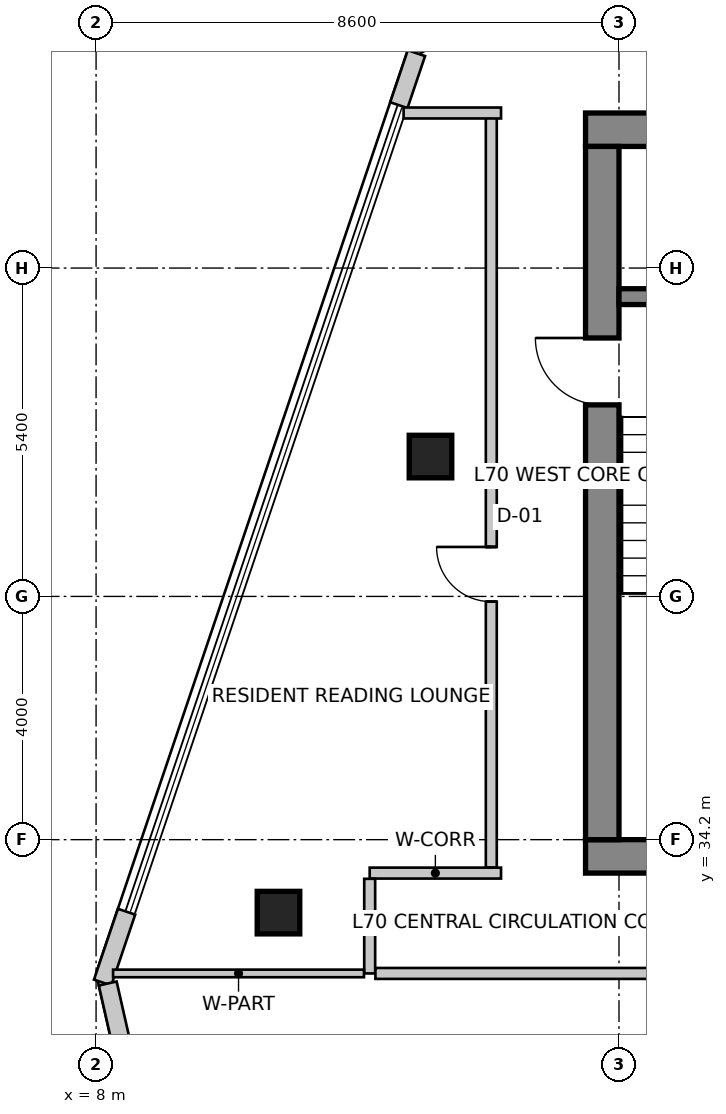
"""IFC4 building model, lengths in metres.
Left out: names, types, materials, properties, quantities, classifications, styles, units other than length and angle.
Written with IfcOpenShell. Run it as: python <this file> out.ifc"""

import sys

from ifc_helpers import new_model, si_unit, direction, frame, frame_2d, origin, origin_2d, place, context, subcontext, project, spatial, rectangle, extrude, source, transform, mapped, element, fill, save


model = new_model("IFC4")
c1 = context("Model", 3, precision=1e-05, world=origin(), true_north=direction((0.0, 1.0)))
c2 = subcontext(c1, "Body", "Model", "MODEL_VIEW")
j1 = project(units=[si_unit("LENGTHUNIT", "METRE"), si_unit("PLANEANGLEUNIT", "RADIAN")], contexts=[c1])
p1 = place(None, origin())
s1 = spatial("IfcSite", under=j1, at=p1, CompositionType="ELEMENT")
p2 = place(p1, origin())
s2 = spatial("IfcBuilding", under=s1, at=p2, CompositionType="ELEMENT")
p3 = place(p2, frame((0.0, 0.0, 274.5)))
s3 = spatial("IfcBuildingStorey", under=s2, at=p3, CompositionType="ELEMENT", Elevation=274.5)
p4 = place(p3, frame((16.05, 45.875, 0.0), z_axis=(0.0, 0.0, 1.0), x_axis=(1.0, 0.0, 0.0)))
e1 = element("IfcWall", 1, at=p4, inside=s3, PredefinedType="SHEAR", context=c2, shape_type="SweptSolid", body=[
    extrude(rectangle(XDim=15.5, YDim=0.55, at=frame_2d((7.75, 0.0))), origin(), (0.0, 0.0, 1.0), 3.6),
])
p5 = place(p3, frame((16.05, 33.925, 0.0), z_axis=(0.0, 0.0, 1.0), x_axis=(1.0, 0.0, 0.0)))
e2 = element("IfcWall", 2, at=p5, inside=s3, PredefinedType="SHEAR", context=c2, shape_type="SweptSolid", body=[
    extrude(rectangle(XDim=15.5, YDim=0.55, at=frame_2d((7.75, 0.0))), origin(), (0.0, 0.0, 1.0), 3.6),
])
m1 = source(origin(), c2, "Body", "SweptSolid", [
    extrude(rectangle(XDim=1.1, YDim=2.15, at=frame_2d((0.55, 1.075))), frame((0.0, 0.285, 0.0), z_axis=(0.0, -1.0, 0.0), x_axis=(1.0, 0.0, 0.0)), (0.0, 0.0, 1.0), 0.57),
])
p6 = place(p5, frame((9.98, 0.0, 0.0)))
e3 = element("IfcOpeningElement", 3, at=p6, cuts=e2, PredefinedType="OPENING", context=c2, shape_type="MappedRepresentation", body=[
    mapped(m1, transform((0.0, 0.0, 0.0), scale=1.0)),
])
p7 = place(p3, frame((16.325, 34.2, 0.0), z_axis=(0.0, 0.0, 1.0), x_axis=(0.0, 1.0, 0.0)))
e4 = element("IfcWall", 4, at=p7, inside=s3, PredefinedType="SHEAR", context=c2, shape_type="SweptSolid", body=[
    extrude(rectangle(XDim=11.4, YDim=0.55, at=frame_2d((5.7, 0.0))), origin(), (0.0, 0.0, 1.0), 3.6),
])
p8 = place(p7, frame((7.15, 0.0, 0.0)))
e5 = element("IfcOpeningElement", 5, at=p8, cuts=e4, PredefinedType="OPENING", context=c2, shape_type="MappedRepresentation", body=[
    mapped(m1, transform((0.0, 0.0, 0.0), scale=1.0)),
])
p9 = place(p3, frame((16.6, 43.13, 0.0), z_axis=(0.0, 0.0, 1.0), x_axis=(1.0, 0.0, 0.0)))
e6 = element("IfcWall", 6, at=p9, inside=s3, PredefinedType="SHEAR", context=c2, shape_type="SweptSolid", body=[
    extrude(rectangle(XDim=3.5, YDim=0.26, at=frame_2d((1.75, 0.0))), origin(), (0.0, 0.0, 1.0), 3.6),
])
m2 = source(origin(), c2, "Body", "SweptSolid", [
    extrude(rectangle(XDim=0.7, YDim=0.7, at=origin_2d()), origin(), (0.0, 0.0, 1.0), 3.6),
])
for number, where, z_axis, x_axis in (
    (7, (11.0, 33.0, 0.0), (0.0, 0.0, 1.0), (1.0, 0.0, 0.0)),
    (8, (13.5, 40.5, 0.0), (0.0, 0.0, 1.0), (1.0, 0.0, 0.0)),
):
    element("IfcColumn", number, at=place(p3, frame(where, z_axis=z_axis, x_axis=x_axis)), inside=s3, PredefinedType="COLUMN", context=c2, shape_type="MappedRepresentation", body=[
        mapped(m2, transform((0.0, 0.0, 0.0), scale=1.0)),
    ])
p10 = place(p3, frame((21.874, 52.742, 0.0), z_axis=(0.0, 0.0, 1.0), x_axis=(-0.84365659959, -0.536883173482, 0.0)))
e9 = element("IfcWall", 9, at=p10, inside=s3, PredefinedType="SOLIDWALL", context=c2, shape_type="SweptSolid", body=[
    extrude(rectangle(XDim=10.283, YDim=0.3, at=frame_2d((5.142, 0.0))), origin(), (0.0, 0.0, 1.0), 3.35),
])
m3 = source(origin(), c2, "Body", "SweptSolid", [
    extrude(rectangle(XDim=2.1, YDim=2.0, at=frame_2d((1.05, 1.0))), frame((0.0, 0.16, 0.0), z_axis=(0.0, -1.0, 0.0), x_axis=(1.0, 0.0, 0.0)), (0.0, 0.0, 1.0), 0.32),
])
p11 = place(p10, frame((1.41, 0.0, 0.85)))
e10 = element("IfcOpeningElement", 10, at=p11, cuts=e9, PredefinedType="OPENING", context=c2, shape_type="MappedRepresentation", body=[
    mapped(m3, transform((0.0, 0.0, 0.0), scale=1.0)),
])
m4 = source(origin(), c2, "Body", "SweptSolid", [
    extrude(rectangle(XDim=2.4, YDim=2.2, at=frame_2d((1.2, 1.1))), frame((0.0, 0.16, 0.0), z_axis=(0.0, -1.0, 0.0), x_axis=(1.0, 0.0, 0.0)), (0.0, 0.0, 1.0), 0.32),
])
p12 = place(p10, frame((5.54, 0.0, 0.85)))
e11 = element("IfcOpeningElement", 11, at=p12, cuts=e9, PredefinedType="OPENING", context=c2, shape_type="MappedRepresentation", body=[
    mapped(m4, transform((0.0, 0.0, 0.0), scale=1.0)),
])
p13 = place(p3, frame((13.269, 47.134, 0.0), z_axis=(0.0, 0.0, 1.0), x_axis=(-0.31995770778, -0.947431826166, 0.0)))
e12 = element("IfcWall", 12, at=p13, inside=s3, PredefinedType="SOLIDWALL", context=c2, shape_type="SweptSolid", body=[
    extrude(rectangle(XDim=0.903, YDim=0.3, at=frame_2d((0.451, 0.0))), origin(), (0.0, 0.0, 1.0), 3.35),
])
p14 = place(p3, frame((8.501, 33.015, 0.0), z_axis=(0.0, 0.0, 1.0), x_axis=(-0.319916718913, -0.94744566755, 0.0)))
e13 = element("IfcWall", 13, at=p14, inside=s3, PredefinedType="SOLIDWALL", context=c2, shape_type="SweptSolid", body=[
    extrude(rectangle(XDim=1.23, YDim=0.3, at=frame_2d((0.615, 0.0))), origin(), (0.0, 0.0, 1.0), 3.35),
])
p15 = place(p3, frame((8.191, 31.834, 0.0), z_axis=(0.0, 0.0, 1.0), x_axis=(0.221636032737, -0.975129462683, 0.0)))
e14 = element("IfcWall", 14, at=p15, inside=s3, PredefinedType="SOLIDWALL", context=c2, shape_type="SweptSolid", body=[
    extrude(rectangle(XDim=10.602, YDim=0.3, at=frame_2d((5.301, 0.0))), origin(), (0.0, 0.0, 1.0), 3.35),
])
p16 = place(p15, frame((2.74, 0.0, 0.85)))
e15 = element("IfcOpeningElement", 15, at=p16, cuts=e14, PredefinedType="OPENING", context=c2, shape_type="MappedRepresentation", body=[
    mapped(m3, transform((0.0, 0.0, 0.0), scale=1.0)),
])
p17 = place(p15, frame((7.941, 0.0, 0.85)))
e16 = element("IfcOpeningElement", 16, at=p17, cuts=e14, PredefinedType="OPENING", context=c2, shape_type="MappedRepresentation", body=[
    mapped(m3, transform((0.0, 0.0, 0.0), scale=1.0)),
])
p18 = place(p3, frame((12.5, 33.65, 0.0), z_axis=(0.0, 0.0, 1.0), x_axis=(1.0, 0.0, 0.0)))
e17 = element("IfcWall", 17, at=p18, inside=s3, PredefinedType="PARTITIONING", context=c2, shape_type="SweptSolid", body=[
    extrude(rectangle(XDim=2.16, YDim=0.18, at=frame_2d((1.08, 0.0))), origin(), (0.0, 0.0, 1.0), 3.35),
])
p19 = place(p3, frame((12.5, 32.0, 0.0), z_axis=(0.0, 0.0, 1.0), x_axis=(0.0, 1.0, 0.0)))
e18 = element("IfcWall", 18, at=p19, inside=s3, PredefinedType="PARTITIONING", context=c2, shape_type="SweptSolid", body=[
    extrude(rectangle(XDim=1.556, YDim=0.18, at=frame_2d((0.778, 0.0))), origin(), (0.0, 0.0, 1.0), 3.019),
])
p20 = place(p3, frame((27.001, 32.0, 0.0), z_axis=(0.0, 0.0, 1.0), x_axis=(-1.0, 0.0, 0.0)))
e19 = element("IfcWall", 19, at=p20, inside=s3, PredefinedType="PARTITIONING", context=c2, shape_type="SweptSolid", body=[
    extrude(rectangle(XDim=14.407, YDim=0.18, at=frame_2d((7.204, 0.0))), origin(), (0.0, 0.0, 1.0), 3.019),
])
m5 = source(origin(), c2, "Body", "SweptSolid", [
    extrude(rectangle(XDim=1.4, YDim=2.15, at=frame_2d((0.7, 1.075))), frame((0.0, 0.1, 0.0), z_axis=(0.0, -1.0, 0.0), x_axis=(1.0, 0.0, 0.0)), (0.0, 0.0, 1.0), 0.2),
])
p21 = place(p20, frame((6.443, 0.0, 0.0)))
e20 = element("IfcOpeningElement", 20, at=p21, cuts=e19, PredefinedType="OPENING", context=c2, shape_type="MappedRepresentation", body=[
    mapped(m5, transform((0.0, 0.0, 0.0), scale=1.0)),
])
p22 = place(p3, frame((14.5, 33.744, 0.0), z_axis=(0.0, 0.0, 1.0), x_axis=(0.0, 1.0, 0.0)))
e21 = element("IfcWall", 21, at=p22, inside=s3, PredefinedType="PARTITIONING", context=c2, shape_type="SweptSolid", body=[
    extrude(rectangle(XDim=12.406, YDim=0.18, at=frame_2d((6.203, 0.0))), origin(), (0.0, 0.0, 1.0), 3.35),
])
m6 = source(origin(), c2, "Body", "SweptSolid", [
    extrude(rectangle(XDim=0.9, YDim=2.15, at=frame_2d((0.45, 1.075))), frame((0.0, 0.1, 0.0), z_axis=(0.0, -1.0, 0.0), x_axis=(1.0, 0.0, 0.0)), (0.0, 0.0, 1.0), 0.2),
])
p23 = place(p22, frame((4.37, 0.0, 0.0)))
e22 = element("IfcOpeningElement", 22, at=p23, cuts=e21, PredefinedType="OPENING", context=c2, shape_type="MappedRepresentation", body=[
    mapped(m6, transform((0.0, 0.0, 0.0), scale=1.0)),
])
p24 = place(p3, frame((14.66, 46.15, 0.0), z_axis=(0.0, 0.0, 1.0), x_axis=(-1.0, 0.0, 0.0)))
e23 = element("IfcWall", 23, at=p24, inside=s3, PredefinedType="PARTITIONING", context=c2, shape_type="SweptSolid", body=[
    extrude(rectangle(XDim=1.602, YDim=0.18, at=frame_2d((0.801, 0.0))), origin(), (0.0, 0.0, 1.0), 3.35),
])
p25 = place(p3, frame((12.406, 32.0, 0.0), z_axis=(0.0, 0.0, 1.0), x_axis=(-1.0, 0.0, 0.0)))
e24 = element("IfcWall", 24, at=p25, inside=s3, PredefinedType="PARTITIONING", context=c2, shape_type="SweptSolid", body=[
    extrude(rectangle(XDim=4.126, YDim=0.125, at=frame_2d((2.063, 0.0))), origin(), (0.0, 0.0, 1.0), 2.642),
])
m7 = source(origin(), c2, "Body", "SweptSolid", [
    extrude(rectangle(XDim=1.1, YDim=2.15, at=frame_2d((0.55, 1.075))), frame((0.0, 0.025, 0.0), z_axis=(0.0, -1.0, 0.0), x_axis=(1.0, 0.0, 0.0)), (0.0, 0.0, 1.0), 0.05),
])
p26 = place(p8, origin())
e25 = element("IfcDoor", 25, at=p26, inside=s3, OperationType="SINGLE_SWING_RIGHT", PredefinedType="DOOR", context=c2, shape_type="MappedRepresentation", body=[
    mapped(m7, transform((0.0, 0.0, 0.0), scale=1.0)),
])
fill(e5, e25)
m8 = source(origin(), c2, "Body", "SweptSolid", [
    extrude(rectangle(XDim=0.9, YDim=2.15, at=frame_2d((0.45, 1.075))), frame((0.0, 0.025, 0.0), z_axis=(0.0, -1.0, 0.0), x_axis=(1.0, 0.0, 0.0)), (0.0, 0.0, 1.0), 0.05),
])
p27 = place(p23, origin())
e26 = element("IfcDoor", 26, at=p27, inside=s3, OperationType="SINGLE_SWING_RIGHT", PredefinedType="DOOR", context=c2, shape_type="MappedRepresentation", body=[
    mapped(m8, transform((0.0, 0.0, 0.0), scale=1.0)),
])
fill(e22, e26)
save(model, sys.argv[1])
